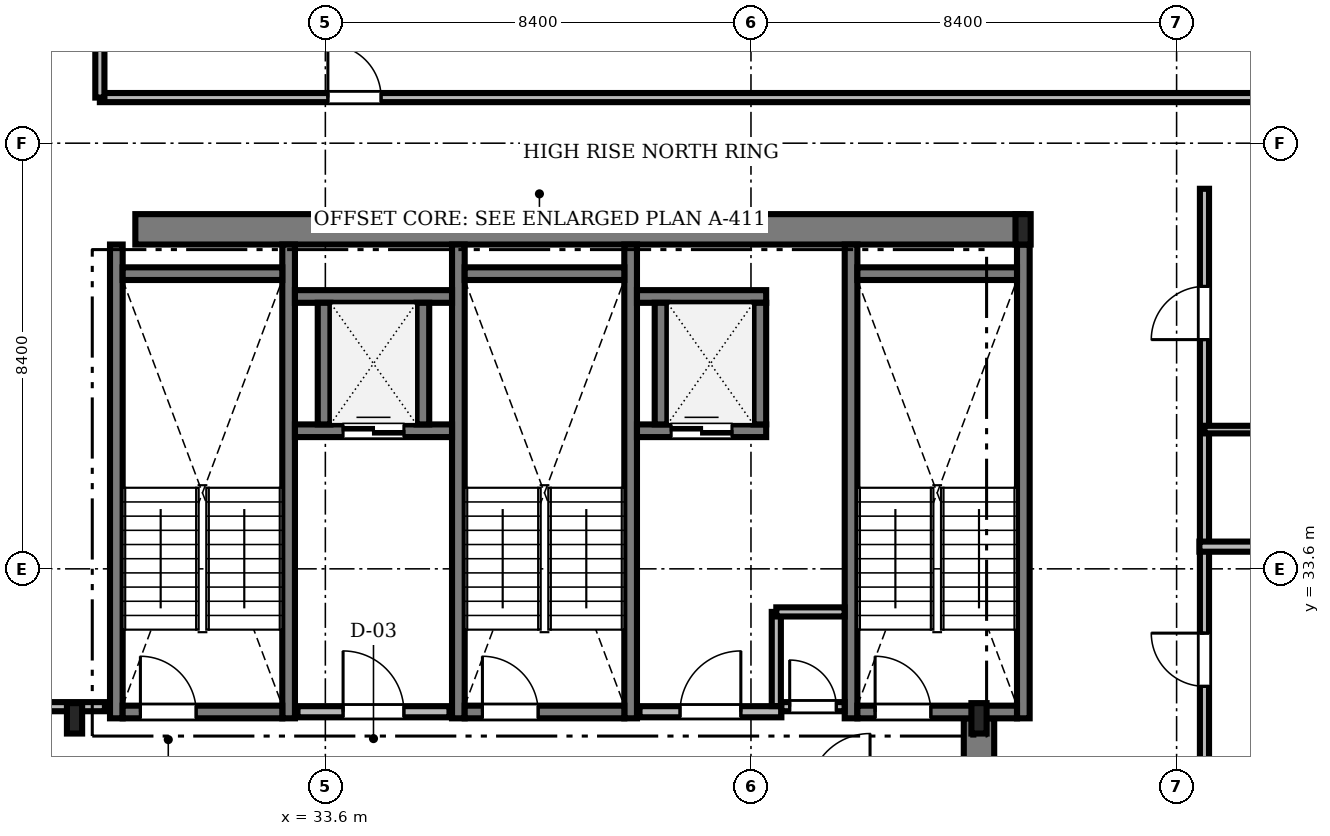
"""IFC4 building model, lengths in metres.
Left out: names, types, materials, properties, quantities, classifications, styles, units other than length and angle.
Written with IfcOpenShell. Run it as: python <this file> out.ifc"""

import sys

from ifc_helpers import new_model, si_unit, direction, frame, frame_2d, origin, origin_2d, place, context, subcontext, project, spatial, rectangle, i_section, extrude, source, transform, mapped, element, fill, save


model = new_model("IFC4")
c1 = context("Model", 3, precision=1e-05, world=origin(), true_north=direction((0.0, 1.0)))
c2 = subcontext(c1, "Body", "Model", "MODEL_VIEW")
j1 = project(units=[si_unit("LENGTHUNIT", "METRE"), si_unit("PLANEANGLEUNIT", "RADIAN")], contexts=[c1])
p1 = place(None, origin())
s1 = spatial("IfcSite", under=j1, at=p1, CompositionType="ELEMENT")
p2 = place(p1, origin())
s2 = spatial("IfcBuilding", under=s1, at=p2, CompositionType="ELEMENT")
p3 = place(p2, frame((0.0, 0.0, 254.55)))
s3 = spatial("IfcBuildingStorey", under=s2, at=p3, CompositionType="ELEMENT", Elevation=254.55)
m1 = source(origin(), c2, "Body", "SweptSolid", [
    extrude(rectangle(XDim=17.52, YDim=0.6, at=frame_2d((8.76, 0.0))), origin(), (0.0, 0.0, 1.0), 3.65),
])
p4 = place(p3, frame((29.85, 40.3, 0.0), z_axis=(0.0, 0.0, 1.0), x_axis=(1.0, 0.0, 0.0)))
e1 = element("IfcWall", 1, at=p4, inside=s3, PredefinedType="SHEAR", context=c2, shape_type="MappedRepresentation", body=[
    mapped(m1, transform((0.0, 0.0, 0.0), scale=1.0)),
])
m2 = source(origin(), c2, "Body", "SweptSolid", [
    extrude(rectangle(XDim=13.15, YDim=0.6, at=frame_2d((6.575, 0.0))), origin(), (0.0, 0.0, 1.0), 3.65),
])
p5 = place(p3, frame((46.5, 17.5, 0.0), z_axis=(0.0, 0.0, 1.0), x_axis=(0.0, 1.0, 0.0)))
e2 = element("IfcWall", 2, at=p5, inside=s3, PredefinedType="SHEAR", context=c2, shape_type="MappedRepresentation", body=[
    mapped(m2, transform((0.0, 0.0, 0.0), scale=1.0)),
])
m3 = source(origin(), c2, "Body", "SweptSolid", [
    extrude(i_section(OverallWidth=0.3, OverallDepth=0.6, WebThickness=0.015, FlangeThickness=0.03, FilletRadius=0.027, at=origin_2d()), origin(), (0.0, 0.0, 1.0), 3.65),
])
for number, where, z_axis, x_axis in (
    (3, (28.65, 30.65, 0.0), (0.0, 0.0, 1.0), (1.0, 0.0, 0.0)),
    (4, (46.5, 30.65, 0.0), (0.0, 0.0, 1.0), (1.0, 0.0, 0.0)),
    (5, (47.37, 40.3, 0.0), (0.0, 0.0, 1.0), (1.0, 0.0, 0.0)),
):
    element("IfcColumn", number, at=place(p3, frame(where, z_axis=z_axis, x_axis=x_axis)), inside=s3, PredefinedType="COLUMN", context=c2, shape_type="MappedRepresentation", body=[
        mapped(m3, transform((0.0, 0.0, 0.0), scale=1.0)),
    ])
m4 = source(origin(), c2, "Body", "SweptSolid", [
    extrude(rectangle(XDim=9.35, YDim=0.25, at=frame_2d((4.675, 0.0))), origin(), (0.0, 0.0, 1.0), 3.75),
])
for number, where, z_axis, x_axis in (
    (6, (29.475, 30.65, 0.0), (0.0, 0.0, 1.0), (0.0, 1.0, 0.0)),
    (7, (32.875, 30.65, 0.0), (0.0, 0.0, 1.0), (0.0, 1.0, 0.0)),
):
    element("IfcWall", number, at=place(p3, frame(where, z_axis=z_axis, x_axis=x_axis)), inside=s3, PredefinedType="SOLIDWALL", context=c2, shape_type="MappedRepresentation", body=[
        mapped(m4, transform((0.0, 0.0, 0.0), scale=1.0)),
    ])
m5 = source(origin(), c2, "Body", "SweptSolid", [
    extrude(rectangle(XDim=3.15, YDim=0.25, at=frame_2d((1.575, 0.0))), origin(), (0.0, 0.0, 1.0), 3.75),
])
p6 = place(p3, frame((29.6, 39.425, 0.0), z_axis=(0.0, 0.0, 1.0), x_axis=(1.0, 0.0, 0.0)))
e8 = element("IfcWall", 8, at=p6, inside=s3, PredefinedType="SOLIDWALL", context=c2, shape_type="MappedRepresentation", body=[
    mapped(m5, transform((0.0, 0.0, 0.0), scale=1.0)),
])
p7 = place(p3, frame((29.6, 30.775, 0.0), z_axis=(0.0, 0.0, 1.0), x_axis=(1.0, 0.0, 0.0)))
e9 = element("IfcWall", 9, at=p7, inside=s3, PredefinedType="SOLIDWALL", context=c2, shape_type="MappedRepresentation", body=[
    mapped(m5, transform((0.0, 0.0, 0.0), scale=1.0)),
])
m6 = source(origin(), c2, "Body", "SweptSolid", [
    extrude(rectangle(XDim=1.1, YDim=2.2, at=frame_2d((0.55, 1.1))), frame((0.0, 0.135, 0.0), z_axis=(0.0, -1.0, 0.0), x_axis=(1.0, 0.0, 0.0)), (0.0, 0.0, 1.0), 0.27),
])
p8 = place(p7, frame((0.35, 0.0, 0.0)))
e10 = element("IfcOpeningElement", 10, at=p8, cuts=e9, PredefinedType="OPENING", context=c2, shape_type="MappedRepresentation", body=[
    mapped(m6, transform((0.0, 0.0, 0.0), scale=1.0)),
])
for number, where, z_axis, x_axis in (
    (11, (36.225, 30.65, 0.0), (0.0, 0.0, 1.0), (0.0, 1.0, 0.0)),
    (12, (39.625, 30.65, 0.0), (0.0, 0.0, 1.0), (0.0, 1.0, 0.0)),
):
    element("IfcWall", number, at=place(p3, frame(where, z_axis=z_axis, x_axis=x_axis)), inside=s3, PredefinedType="SOLIDWALL", context=c2, shape_type="MappedRepresentation", body=[
        mapped(m4, transform((0.0, 0.0, 0.0), scale=1.0)),
    ])
p9 = place(p3, frame((36.35, 39.425, 0.0), z_axis=(0.0, 0.0, 1.0), x_axis=(1.0, 0.0, 0.0)))
e13 = element("IfcWall", 13, at=p9, inside=s3, PredefinedType="SOLIDWALL", context=c2, shape_type="MappedRepresentation", body=[
    mapped(m5, transform((0.0, 0.0, 0.0), scale=1.0)),
])
p10 = place(p3, frame((36.35, 30.775, 0.0), z_axis=(0.0, 0.0, 1.0), x_axis=(1.0, 0.0, 0.0)))
e14 = element("IfcWall", 14, at=p10, inside=s3, PredefinedType="SOLIDWALL", context=c2, shape_type="MappedRepresentation", body=[
    mapped(m5, transform((0.0, 0.0, 0.0), scale=1.0)),
])
p11 = place(p10, frame((0.35, 0.0, 0.0)))
e15 = element("IfcOpeningElement", 15, at=p11, cuts=e14, PredefinedType="OPENING", context=c2, shape_type="MappedRepresentation", body=[
    mapped(m6, transform((0.0, 0.0, 0.0), scale=1.0)),
])
for number, where, z_axis, x_axis in (
    (16, (43.975, 30.65, 0.0), (0.0, 0.0, 1.0), (0.0, 1.0, 0.0)),
    (17, (47.375, 30.65, 0.0), (0.0, 0.0, 1.0), (0.0, 1.0, 0.0)),
):
    element("IfcWall", number, at=place(p3, frame(where, z_axis=z_axis, x_axis=x_axis)), inside=s3, PredefinedType="SOLIDWALL", context=c2, shape_type="MappedRepresentation", body=[
        mapped(m4, transform((0.0, 0.0, 0.0), scale=1.0)),
    ])
p12 = place(p3, frame((44.1, 39.425, 0.0), z_axis=(0.0, 0.0, 1.0), x_axis=(1.0, 0.0, 0.0)))
e18 = element("IfcWall", 18, at=p12, inside=s3, PredefinedType="SOLIDWALL", context=c2, shape_type="MappedRepresentation", body=[
    mapped(m5, transform((0.0, 0.0, 0.0), scale=1.0)),
])
p13 = place(p3, frame((44.1, 30.775, 0.0), z_axis=(0.0, 0.0, 1.0), x_axis=(1.0, 0.0, 0.0)))
e19 = element("IfcWall", 19, at=p13, inside=s3, PredefinedType="SOLIDWALL", context=c2, shape_type="MappedRepresentation", body=[
    mapped(m5, transform((0.0, 0.0, 0.0), scale=1.0)),
])
p14 = place(p13, frame((0.35, 0.0, 0.0)))
e20 = element("IfcOpeningElement", 20, at=p14, cuts=e19, PredefinedType="OPENING", context=c2, shape_type="MappedRepresentation", body=[
    mapped(m6, transform((0.0, 0.0, 0.0), scale=1.0)),
])
m7 = source(origin(), c2, "Body", "SweptSolid", [
    extrude(rectangle(XDim=3.0, YDim=0.22, at=frame_2d((1.5, 0.0))), origin(), (0.0, 0.0, 1.0), 3.65),
])
p15 = place(p3, frame((33.05, 30.78, 0.0), z_axis=(0.0, 0.0, 1.0), x_axis=(1.0, 0.0, 0.0)))
e21 = element("IfcWall", 21, at=p15, inside=s3, PredefinedType="SOLIDWALL", context=c2, shape_type="MappedRepresentation", body=[
    mapped(m7, transform((0.0, 0.0, 0.0), scale=1.0)),
])
m8 = source(origin(), c2, "Body", "SweptSolid", [
    extrude(rectangle(XDim=1.2, YDim=2.2, at=frame_2d((0.6, 1.1))), frame((0.0, 0.12, 0.0), z_axis=(0.0, -1.0, 0.0), x_axis=(1.0, 0.0, 0.0)), (0.0, 0.0, 1.0), 0.24),
])
p16 = place(p15, frame((0.9, 0.0, 0.0)))
e22 = element("IfcOpeningElement", 22, at=p16, cuts=e21, PredefinedType="OPENING", context=c2, shape_type="MappedRepresentation", body=[
    mapped(m8, transform((0.0, 0.0, 0.0), scale=1.0)),
])
m9 = source(origin(), c2, "Body", "SweptSolid", [
    extrude(rectangle(XDim=2.8, YDim=0.22, at=frame_2d((1.4, 0.0))), origin(), (0.0, 0.0, 1.0), 3.65),
])
p17 = place(p3, frame((39.8, 30.78, 0.0), z_axis=(0.0, 0.0, 1.0), x_axis=(1.0, 0.0, 0.0)))
e23 = element("IfcWall", 23, at=p17, inside=s3, PredefinedType="SOLIDWALL", context=c2, shape_type="MappedRepresentation", body=[
    mapped(m9, transform((0.0, 0.0, 0.0), scale=1.0)),
])
p18 = place(p17, frame((0.8, 0.0, 0.0)))
e24 = element("IfcOpeningElement", 24, at=p18, cuts=e23, PredefinedType="OPENING", context=c2, shape_type="MappedRepresentation", body=[
    mapped(m8, transform((0.0, 0.0, 0.0), scale=1.0)),
])
m10 = source(origin(), c2, "Body", "SweptSolid", [
    extrude(rectangle(XDim=3.1, YDim=0.25, at=frame_2d((1.55, 0.0))), origin(), (0.0, 0.0, 1.0), 3.65),
])
p19 = place(p3, frame((33.0, 36.325, 0.0), z_axis=(0.0, 0.0, 1.0), x_axis=(1.0, 0.0, 0.0)))
e25 = element("IfcWall", 25, at=p19, inside=s3, PredefinedType="SOLIDWALL", context=c2, shape_type="MappedRepresentation", body=[
    mapped(m10, transform((0.0, 0.0, 0.0), scale=1.0)),
])
m11 = source(origin(), c2, "Body", "SweptSolid", [
    extrude(rectangle(XDim=1.2, YDim=2.25, at=frame_2d((0.6, 1.125))), frame((0.0, 0.135, 0.0), z_axis=(0.0, -1.0, 0.0), x_axis=(1.0, 0.0, 0.0)), (0.0, 0.0, 1.0), 0.27),
])
p20 = place(p19, frame((0.95, 0.0, 0.0)))
e26 = element("IfcOpeningElement", 26, at=p20, cuts=e25, PredefinedType="OPENING", context=c2, shape_type="MappedRepresentation", body=[
    mapped(m11, transform((0.0, 0.0, 0.0), scale=1.0)),
])
p21 = place(p3, frame((33.0, 38.975, 0.0), z_axis=(0.0, 0.0, 1.0), x_axis=(1.0, 0.0, 0.0)))
e27 = element("IfcWall", 27, at=p21, inside=s3, PredefinedType="SOLIDWALL", context=c2, shape_type="MappedRepresentation", body=[
    mapped(m10, transform((0.0, 0.0, 0.0), scale=1.0)),
])
m12 = source(origin(), c2, "Body", "SweptSolid", [
    extrude(rectangle(XDim=2.4, YDim=0.25, at=frame_2d((1.2, 0.0))), origin(), (0.0, 0.0, 1.0), 3.65),
])
for number, where, z_axis, x_axis in (
    (28, (33.575, 36.45, 0.0), (0.0, 0.0, 1.0), (0.0, 1.0, 0.0)),
    (29, (35.525, 36.45, 0.0), (0.0, 0.0, 1.0), (0.0, 1.0, 0.0)),
):
    element("IfcWall", number, at=place(p3, frame(where, z_axis=z_axis, x_axis=x_axis)), inside=s3, PredefinedType="SOLIDWALL", context=c2, shape_type="MappedRepresentation", body=[
        mapped(m12, transform((0.0, 0.0, 0.0), scale=1.0)),
    ])
m13 = source(origin(), c2, "Body", "SweptSolid", [
    extrude(rectangle(XDim=2.55, YDim=0.25, at=frame_2d((1.275, 0.0))), origin(), (0.0, 0.0, 1.0), 3.65),
])
p22 = place(p3, frame((39.75, 36.325, 0.0), z_axis=(0.0, 0.0, 1.0), x_axis=(1.0, 0.0, 0.0)))
e30 = element("IfcWall", 30, at=p22, inside=s3, PredefinedType="SOLIDWALL", context=c2, shape_type="MappedRepresentation", body=[
    mapped(m13, transform((0.0, 0.0, 0.0), scale=1.0)),
])
p23 = place(p22, frame((0.675, 0.0, 0.0)))
e31 = element("IfcOpeningElement", 31, at=p23, cuts=e30, PredefinedType="OPENING", context=c2, shape_type="MappedRepresentation", body=[
    mapped(m11, transform((0.0, 0.0, 0.0), scale=1.0)),
])
p24 = place(p3, frame((39.75, 38.975, 0.0), z_axis=(0.0, 0.0, 1.0), x_axis=(1.0, 0.0, 0.0)))
e32 = element("IfcWall", 32, at=p24, inside=s3, PredefinedType="SOLIDWALL", context=c2, shape_type="MappedRepresentation", body=[
    mapped(m13, transform((0.0, 0.0, 0.0), scale=1.0)),
])
for number, where, z_axis, x_axis in (
    (33, (40.225, 36.45, 0.0), (0.0, 0.0, 1.0), (0.0, 1.0, 0.0)),
    (34, (42.175, 36.45, 0.0), (0.0, 0.0, 1.0), (0.0, 1.0, 0.0)),
):
    element("IfcWall", number, at=place(p3, frame(where, z_axis=z_axis, x_axis=x_axis)), inside=s3, PredefinedType="SOLIDWALL", context=c2, shape_type="MappedRepresentation", body=[
        mapped(m12, transform((0.0, 0.0, 0.0), scale=1.0)),
    ])
m14 = source(origin(), c2, "Body", "SweptSolid", [
    extrude(rectangle(XDim=32.928, YDim=0.18, at=frame_2d((16.464, 0.0))), origin(), (0.0, 0.0, 1.0), 2.892),
])
p25 = place(p3, frame((29.15, 42.9, 0.0), z_axis=(0.0, 0.0, 1.0), x_axis=(1.0, 0.0, 0.0)))
e35 = element("IfcWall", 35, at=p25, inside=s3, PredefinedType="PARTITIONING", context=c2, shape_type="MappedRepresentation", body=[
    mapped(m14, transform((0.0, 0.0, 0.0), scale=1.0)),
])
m15 = source(origin(), c2, "Body", "SweptSolid", [
    extrude(rectangle(XDim=1.05, YDim=2.2, at=frame_2d((0.525, 1.1))), frame((0.0, 0.1, 0.0), z_axis=(0.0, -1.0, 0.0), x_axis=(1.0, 0.0, 0.0)), (0.0, 0.0, 1.0), 0.2),
])
p26 = place(p25, frame((4.5, 0.0, 0.0)))
e36 = element("IfcOpeningElement", 36, at=p26, cuts=e35, PredefinedType="OPENING", context=c2, shape_type="MappedRepresentation", body=[
    mapped(m15, transform((0.0, 0.0, 0.0), scale=1.0)),
])
m16 = source(origin(), c2, "Body", "SweptSolid", [
    extrude(rectangle(XDim=27.59, YDim=0.18, at=frame_2d((13.795, 0.0))), origin(), (0.0, 0.0, 1.0), 3.092),
])
p27 = place(p3, frame((50.95, 13.51, 0.0), z_axis=(0.0, 0.0, 1.0), x_axis=(0.0, 1.0, 0.0)))
e37 = element("IfcWall", 37, at=p27, inside=s3, PredefinedType="PARTITIONING", context=c2, shape_type="MappedRepresentation", body=[
    mapped(m16, transform((0.0, 0.0, 0.0), scale=1.0)),
])
p28 = place(p27, frame((4.086, 0.0, 0.0)))
e38 = element("IfcOpeningElement", 38, at=p28, cuts=e37, PredefinedType="OPENING", context=c2, shape_type="MappedRepresentation", body=[
    mapped(m15, transform((0.0, 0.0, 0.0), scale=1.0)),
])
p29 = place(p27, frame((9.744, 0.0, 0.0)))
e39 = element("IfcOpeningElement", 39, at=p29, cuts=e37, PredefinedType="OPENING", context=c2, shape_type="MappedRepresentation", body=[
    mapped(m15, transform((0.0, 0.0, 0.0), scale=1.0)),
])
p30 = place(p27, frame((17.771, 0.0, 0.0)))
e40 = element("IfcOpeningElement", 40, at=p30, cuts=e37, PredefinedType="OPENING", context=c2, shape_type="MappedRepresentation", body=[
    mapped(m15, transform((0.0, 0.0, 0.0), scale=1.0)),
])
p31 = place(p27, frame((24.614, 0.0, 0.0)))
e41 = element("IfcOpeningElement", 41, at=p31, cuts=e37, PredefinedType="OPENING", context=c2, shape_type="MappedRepresentation", body=[
    mapped(m15, transform((0.0, 0.0, 0.0), scale=1.0)),
])
m17 = source(origin(), c2, "Body", "SweptSolid", [
    extrude(rectangle(XDim=13.328, YDim=0.18, at=frame_2d((6.664, 0.0))), origin(), (0.0, 0.0, 1.0), 2.892),
])
p32 = place(p3, frame((15.922, 30.88, 0.0), z_axis=(0.0, 0.0, 1.0), x_axis=(1.0, 0.0, 0.0)))
e42 = element("IfcWall", 42, at=p32, inside=s3, PredefinedType="PARTITIONING", context=c2, shape_type="MappedRepresentation", body=[
    mapped(m17, transform((0.0, 0.0, 0.0), scale=1.0)),
])
p33 = place(p32, frame((6.278, 0.0, 0.0)))
e43 = element("IfcOpeningElement", 43, at=p33, cuts=e42, PredefinedType="OPENING", context=c2, shape_type="MappedRepresentation", body=[
    mapped(m15, transform((0.0, 0.0, 0.0), scale=1.0)),
])
m18 = source(origin(), c2, "Body", "SweptSolid", [
    extrude(rectangle(XDim=1.248, YDim=0.18, at=frame_2d((0.624, 0.0))), origin(), (0.0, 0.0, 1.0), 3.65),
])
p34 = place(p3, frame((42.6, 30.88, 0.0), z_axis=(0.0, 0.0, 1.0), x_axis=(1.0, 0.0, 0.0)))
e44 = element("IfcWall", 44, at=p34, inside=s3, PredefinedType="PARTITIONING", context=c2, shape_type="MappedRepresentation", body=[
    mapped(m18, transform((0.0, 0.0, 0.0), scale=1.0)),
])
m19 = source(origin(), c2, "Body", "SweptSolid", [
    extrude(rectangle(XDim=0.92, YDim=2.1, at=frame_2d((0.46, 1.05))), frame((0.0, 0.1, 0.0), z_axis=(0.0, -1.0, 0.0), x_axis=(1.0, 0.0, 0.0)), (0.0, 0.0, 1.0), 0.2),
])
p35 = place(p34, frame((0.164, 0.0, 0.0)))
e45 = element("IfcOpeningElement", 45, at=p35, cuts=e44, PredefinedType="OPENING", context=c2, shape_type="MappedRepresentation", body=[
    mapped(m19, transform((0.0, 0.0, 0.0), scale=1.0)),
])
m20 = source(origin(), c2, "Body", "SweptSolid", [
    extrude(rectangle(XDim=11.228, YDim=0.2, at=frame_2d((5.614, 0.0))), origin(), (0.0, 0.0, 1.0), 2.892),
])
p36 = place(p3, frame((50.85, 34.038, 0.0), z_axis=(0.0, 0.0, 1.0), x_axis=(1.0, 0.0, 0.0)))
e46 = element("IfcWall", 46, at=p36, inside=s3, PredefinedType="PARTITIONING", context=c2, shape_type="MappedRepresentation", body=[
    mapped(m20, transform((0.0, 0.0, 0.0), scale=1.0)),
])
m21 = source(origin(), c2, "Body", "SweptSolid", [
    extrude(rectangle(XDim=5.378, YDim=0.18, at=frame_2d((2.689, 0.0))), origin(), (0.0, 0.0, 1.0), 2.892),
])
p37 = place(p3, frame((29.15, 42.9, 0.0), z_axis=(0.0, 0.0, 1.0), x_axis=(0.0, 1.0, 0.0)))
e47 = element("IfcWall", 47, at=p37, inside=s3, PredefinedType="PARTITIONING", context=c2, shape_type="MappedRepresentation", body=[
    mapped(m21, transform((0.0, 0.0, 0.0), scale=1.0)),
])
m22 = source(origin(), c2, "Body", "SweptSolid", [
    extrude(rectangle(XDim=2.36, YDim=0.15, at=frame_2d((1.18, 0.0))), origin(), (0.0, 0.0, 1.0), 3.65),
])
p38 = place(p3, frame((50.95, 36.348, 0.0), z_axis=(0.0, 0.0, 1.0), x_axis=(1.0, 0.0, 0.0)))
e48 = element("IfcWall", 48, at=p38, inside=s3, PredefinedType="PARTITIONING", context=c2, shape_type="MappedRepresentation", body=[
    mapped(m22, transform((0.0, 0.0, 0.0), scale=1.0)),
])
m23 = source(origin(), c2, "Body", "SweptSolid", [
    extrude(rectangle(XDim=1.858, YDim=0.18, at=frame_2d((0.929, 0.0))), origin(), (0.0, 0.0, 1.0), 3.65),
])
p39 = place(p3, frame((42.5, 30.892, 0.0), z_axis=(0.0, 0.0, 1.0), x_axis=(0.0, 1.0, 0.0)))
e49 = element("IfcWall", 49, at=p39, inside=s3, PredefinedType="PARTITIONING", context=c2, shape_type="MappedRepresentation", body=[
    mapped(m23, transform((0.0, 0.0, 0.0), scale=1.0)),
])
m24 = source(origin(), c2, "Body", "SweptSolid", [
    extrude(rectangle(XDim=1.348, YDim=0.18, at=frame_2d((0.674, 0.0))), origin(), (0.0, 0.0, 1.0), 3.65),
])
p40 = place(p3, frame((42.5, 32.75, 0.0), z_axis=(0.0, 0.0, 1.0), x_axis=(1.0, 0.0, 0.0)))
e50 = element("IfcWall", 50, at=p40, inside=s3, PredefinedType="PARTITIONING", context=c2, shape_type="MappedRepresentation", body=[
    mapped(m24, transform((0.0, 0.0, 0.0), scale=1.0)),
])
m25 = source(origin(), c2, "Body", "SweptSolid", [
    extrude(rectangle(XDim=1.1, YDim=2.2, at=frame_2d((0.55, 1.1))), frame((0.0, 0.025, 0.0), z_axis=(0.0, -1.0, 0.0), x_axis=(1.0, 0.0, 0.0)), (0.0, 0.0, 1.0), 0.05),
])
p41 = place(p8, origin())
e51 = element("IfcDoor", 51, at=p41, inside=s3, OperationType="SINGLE_SWING_LEFT", PredefinedType="DOOR", context=c2, shape_type="MappedRepresentation", body=[
    mapped(m25, transform((0.0, 0.0, 0.0), scale=1.0)),
])
fill(e10, e51)
p42 = place(p11, origin())
e52 = element("IfcDoor", 52, at=p42, inside=s3, OperationType="SINGLE_SWING_LEFT", PredefinedType="DOOR", context=c2, shape_type="MappedRepresentation", body=[
    mapped(m25, transform((0.0, 0.0, 0.0), scale=1.0)),
])
fill(e15, e52)
p43 = place(p14, origin())
e53 = element("IfcDoor", 53, at=p43, inside=s3, OperationType="SINGLE_SWING_LEFT", PredefinedType="DOOR", context=c2, shape_type="MappedRepresentation", body=[
    mapped(m25, transform((0.0, 0.0, 0.0), scale=1.0)),
])
fill(e20, e53)
m26 = source(origin(), c2, "Body", "SweptSolid", [
    extrude(rectangle(XDim=1.2, YDim=2.2, at=frame_2d((0.6, 1.1))), frame((0.0, 0.025, 0.0), z_axis=(0.0, -1.0, 0.0), x_axis=(1.0, 0.0, 0.0)), (0.0, 0.0, 1.0), 0.05),
])
p44 = place(p16, origin())
e54 = element("IfcDoor", 54, at=p44, inside=s3, OperationType="SINGLE_SWING_LEFT", PredefinedType="DOOR", context=c2, shape_type="MappedRepresentation", body=[
    mapped(m26, transform((0.0, 0.0, 0.0), scale=1.0)),
])
fill(e22, e54)
p45 = place(p18, origin())
e55 = element("IfcDoor", 55, at=p45, inside=s3, OperationType="SINGLE_SWING_RIGHT", PredefinedType="DOOR", context=c2, shape_type="MappedRepresentation", body=[
    mapped(m26, transform((0.0, 0.0, 0.0), scale=1.0)),
])
fill(e24, e55)
m27 = source(origin(), c2, "Body", "SweptSolid", [
    extrude(rectangle(XDim=1.2, YDim=2.25, at=frame_2d((0.6, 1.125))), frame((0.0, 0.025, 0.0), z_axis=(0.0, -1.0, 0.0), x_axis=(1.0, 0.0, 0.0)), (0.0, 0.0, 1.0), 0.05),
])
p46 = place(p20, origin())
e56 = element("IfcDoor", 56, at=p46, inside=s3, OperationType="DOUBLE_DOOR_SLIDING", PredefinedType="DOOR", context=c2, shape_type="MappedRepresentation", body=[
    mapped(m27, transform((0.0, 0.0, 0.0), scale=1.0)),
])
fill(e26, e56)
p47 = place(p23, origin())
e57 = element("IfcDoor", 57, at=p47, inside=s3, OperationType="DOUBLE_DOOR_SLIDING", PredefinedType="DOOR", context=c2, shape_type="MappedRepresentation", body=[
    mapped(m27, transform((0.0, 0.0, 0.0), scale=1.0)),
])
fill(e31, e57)
m28 = source(origin(), c2, "Body", "SweptSolid", [
    extrude(rectangle(XDim=1.05, YDim=2.2, at=frame_2d((0.525, 1.1))), frame((0.0, 0.025, 0.0), z_axis=(0.0, -1.0, 0.0), x_axis=(1.0, 0.0, 0.0)), (0.0, 0.0, 1.0), 0.05),
])
p48 = place(p26, origin())
e58 = element("IfcDoor", 58, at=p48, inside=s3, OperationType="SINGLE_SWING_LEFT", PredefinedType="DOOR", context=c2, shape_type="MappedRepresentation", body=[
    mapped(m28, transform((0.0, 0.0, 0.0), scale=1.0)),
])
fill(e36, e58)
p49 = place(p30, origin())
e59 = element("IfcDoor", 59, at=p49, inside=s3, OperationType="SINGLE_SWING_RIGHT", PredefinedType="DOOR", context=c2, shape_type="MappedRepresentation", body=[
    mapped(m28, transform((0.0, 0.0, 0.0), scale=1.0)),
])
fill(e40, e59)
p50 = place(p31, origin())
e60 = element("IfcDoor", 60, at=p50, inside=s3, OperationType="SINGLE_SWING_LEFT", PredefinedType="DOOR", context=c2, shape_type="MappedRepresentation", body=[
    mapped(m28, transform((0.0, 0.0, 0.0), scale=1.0)),
])
fill(e41, e60)
m29 = source(origin(), c2, "Body", "SweptSolid", [
    extrude(rectangle(XDim=0.92, YDim=2.1, at=frame_2d((0.46, 1.05))), frame((0.0, 0.025, 0.0), z_axis=(0.0, -1.0, 0.0), x_axis=(1.0, 0.0, 0.0)), (0.0, 0.0, 1.0), 0.05),
])
p51 = place(p35, origin())
e61 = element("IfcDoor", 61, at=p51, inside=s3, OperationType="SINGLE_SWING_LEFT", PredefinedType="DOOR", context=c2, shape_type="MappedRepresentation", body=[
    mapped(m29, transform((0.0, 0.0, 0.0), scale=1.0)),
])
fill(e45, e61)
save(model, sys.argv[1])
